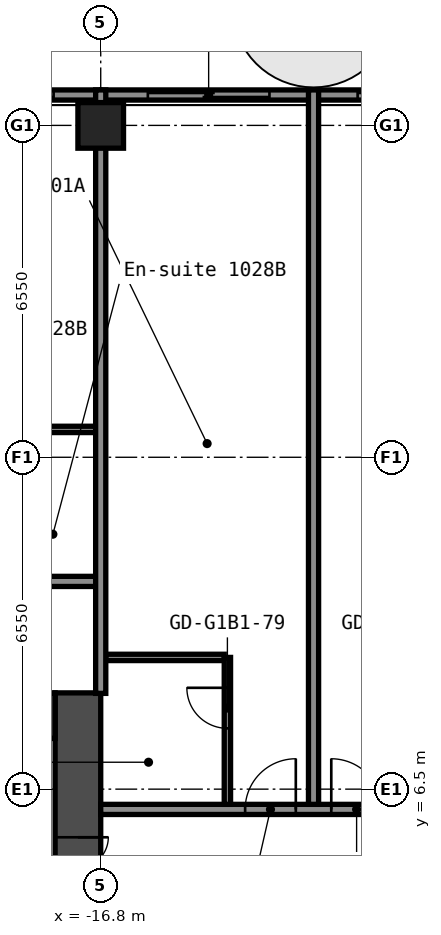
"""IFC4 building model, lengths in metres.
Left out: names, types, materials, properties, quantities, classifications, styles, units other than length and angle.
Written with IfcOpenShell. Run it as: python <this file> out.ifc"""

import sys

from ifc_helpers import new_model, si_unit, direction, frame, frame_2d, origin, origin_2d, place, context, subcontext, project, spatial, rectangle, hollow_rectangle, extrude, element, fill, save


model = new_model("IFC4")
c1 = context("Model", 3, precision=1e-05, world=origin(), true_north=direction((0.0, 1.0)))
c2 = subcontext(c1, "Body", "Model", "MODEL_VIEW")
j1 = project(units=[si_unit("LENGTHUNIT", "METRE"), si_unit("PLANEANGLEUNIT", "RADIAN")], contexts=[c1])
p1 = place(None, origin())
s1 = spatial("IfcSite", under=j1, at=p1, CompositionType="ELEMENT")
p2 = place(p1, origin())
s2 = spatial("IfcBuilding", under=s1, at=p2, CompositionType="ELEMENT")
p3 = place(p2, frame((0.0, 0.0, 39.0)))
s3 = spatial("IfcBuildingStorey", under=s2, at=p3, CompositionType="ELEMENT", Elevation=39.0)
p4 = place(p3, frame((-16.8, 19.6, 0.0), z_axis=(0.0, 0.0, 1.0), x_axis=(1.0, 0.0, 0.0)))
e1 = element("IfcColumn", 1, at=p4, inside=s3, PredefinedType="COLUMN", context=c2, shape_type="SweptSolid", body=[
    extrude(hollow_rectangle(XDim=0.9, YDim=0.9, WallThickness=0.036, at=origin_2d()), origin(), (0.0, 0.0, 1.0), 2.8),
])
p5 = place(p3, frame((-17.25, -8.4, 0.0), z_axis=(0.0, 0.0, 1.0), x_axis=(0.0, 1.0, 0.0)))
e2 = element("IfcWall", 2, at=p5, inside=s3, PredefinedType="SHEAR", context=c2, shape_type="SweptSolid", body=[
    extrude(rectangle(XDim=16.8, YDim=0.9, at=frame_2d((8.4, 0.0))), origin(), (0.0, 0.0, 1.0), 2.8),
])
p6 = place(p5, frame((12.75, 0.0, 0.0)))
e3 = element("IfcOpeningElement", 3, at=p6, cuts=e2, PredefinedType="OPENING", context=c2, shape_type="SweptSolid", body=[
    extrude(rectangle(XDim=1.2, YDim=2.1, at=frame_2d((0.6, 1.05))), frame((0.0, 0.46, 0.0), z_axis=(0.0, -1.0, 0.0), x_axis=(1.0, 0.0, 0.0)), (0.0, 0.0, 1.0), 0.92),
])
p7 = place(p5, frame((2.85, 0.0, 0.0)))
e4 = element("IfcOpeningElement", 4, at=p7, cuts=e2, PredefinedType="OPENING", context=c2, shape_type="SweptSolid", body=[
    extrude(rectangle(XDim=1.2, YDim=2.1, at=frame_2d((0.6, 1.05))), frame((0.0, 0.46, 0.0), z_axis=(0.0, -1.0, 0.0), x_axis=(1.0, 0.0, 0.0)), (0.0, 0.0, 1.0), 0.92),
])
p8 = place(p3, frame((-32.7, 7.95, 0.0), z_axis=(0.0, 0.0, 1.0), x_axis=(1.0, 0.0, 0.0)))
e5 = element("IfcWall", 5, at=p8, inside=s3, PredefinedType="SHEAR", context=c2, shape_type="SweptSolid", body=[
    extrude(rectangle(XDim=15.0, YDim=0.9, at=frame_2d((7.5, 0.0))), origin(), (0.0, 0.0, 1.0), 2.8),
])
p9 = place(p8, frame((3.4, 0.0, 0.0)))
e6 = element("IfcOpeningElement", 6, at=p9, cuts=e5, PredefinedType="OPENING", context=c2, shape_type="SweptSolid", body=[
    extrude(rectangle(XDim=1.2, YDim=2.1, at=frame_2d((0.6, 1.05))), frame((0.0, 0.46, 0.0), z_axis=(0.0, -1.0, 0.0), x_axis=(1.0, 0.0, 0.0)), (0.0, 0.0, 1.0), 0.92),
])
p10 = place(p8, frame((0.75, 0.0, 0.0)))
e7 = element("IfcOpeningElement", 7, at=p10, cuts=e5, PredefinedType="OPENING", context=c2, shape_type="SweptSolid", body=[
    extrude(rectangle(XDim=0.9, YDim=2.1, at=frame_2d((0.45, 1.05))), frame((0.0, 0.46, 0.0), z_axis=(0.0, -1.0, 0.0), x_axis=(1.0, 0.0, 0.0)), (0.0, 0.0, 1.0), 0.92),
])
p11 = place(p3, frame((-16.8, 6.1, 0.0), z_axis=(0.0, 0.0, 1.0), x_axis=(1.0, 0.0, 0.0)))
e8 = element("IfcWall", 8, at=p11, inside=s3, PredefinedType="PARTITIONING", context=c2, shape_type="SweptSolid", body=[
    extrude(rectangle(XDim=33.6, YDim=0.2, at=frame_2d((16.8, 0.0))), origin(), (0.0, 0.0, 1.0), 2.8),
])
p12 = place(p11, frame((2.85, 0.0, 0.0)))
e9 = element("IfcOpeningElement", 9, at=p12, cuts=e8, PredefinedType="OPENING", context=c2, shape_type="SweptSolid", body=[
    extrude(rectangle(XDim=1.0, YDim=2.1, at=frame_2d((0.5, 1.05))), frame((0.0, 0.11, 0.0), z_axis=(0.0, -1.0, 0.0), x_axis=(1.0, 0.0, 0.0)), (0.0, 0.0, 1.0), 0.22),
])
p13 = place(p11, frame((4.55, 0.0, 0.0)))
e10 = element("IfcOpeningElement", 10, at=p13, cuts=e8, PredefinedType="OPENING", context=c2, shape_type="SweptSolid", body=[
    extrude(rectangle(XDim=1.0, YDim=2.1, at=frame_2d((0.5, 1.05))), frame((0.0, 0.11, 0.0), z_axis=(0.0, -1.0, 0.0), x_axis=(1.0, 0.0, 0.0)), (0.0, 0.0, 1.0), 0.22),
])
p14 = place(p11, frame((10.555, 0.0, 0.0)))
e11 = element("IfcOpeningElement", 11, at=p14, cuts=e8, PredefinedType="OPENING", context=c2, shape_type="SweptSolid", body=[
    extrude(rectangle(XDim=0.9, YDim=2.1, at=frame_2d((0.45, 1.05))), frame((0.0, 0.11, 0.0), z_axis=(0.0, -1.0, 0.0), x_axis=(1.0, 0.0, 0.0)), (0.0, 0.0, 1.0), 0.22),
])
p15 = place(p11, frame((14.755, 0.0, 0.0)))
e12 = element("IfcOpeningElement", 12, at=p15, cuts=e8, PredefinedType="OPENING", context=c2, shape_type="SweptSolid", body=[
    extrude(rectangle(XDim=0.9, YDim=2.1, at=frame_2d((0.45, 1.05))), frame((0.0, 0.11, 0.0), z_axis=(0.0, -1.0, 0.0), x_axis=(1.0, 0.0, 0.0)), (0.0, 0.0, 1.0), 0.22),
])
p16 = place(p11, frame((19.65, 0.0, 0.0)))
e13 = element("IfcOpeningElement", 13, at=p16, cuts=e8, PredefinedType="OPENING", context=c2, shape_type="SweptSolid", body=[
    extrude(rectangle(XDim=1.0, YDim=2.1, at=frame_2d((0.5, 1.05))), frame((0.0, 0.11, 0.0), z_axis=(0.0, -1.0, 0.0), x_axis=(1.0, 0.0, 0.0)), (0.0, 0.0, 1.0), 0.22),
])
p17 = place(p11, frame((21.35, 0.0, 0.0)))
e14 = element("IfcOpeningElement", 14, at=p17, cuts=e8, PredefinedType="OPENING", context=c2, shape_type="SweptSolid", body=[
    extrude(rectangle(XDim=1.0, YDim=2.1, at=frame_2d((0.5, 1.05))), frame((0.0, 0.11, 0.0), z_axis=(0.0, -1.0, 0.0), x_axis=(1.0, 0.0, 0.0)), (0.0, 0.0, 1.0), 0.22),
])
p18 = place(p11, frame((28.05, 0.0, 0.0)))
e15 = element("IfcOpeningElement", 15, at=p18, cuts=e8, PredefinedType="OPENING", context=c2, shape_type="SweptSolid", body=[
    extrude(rectangle(XDim=1.0, YDim=2.1, at=frame_2d((0.5, 1.05))), frame((0.0, 0.11, 0.0), z_axis=(0.0, -1.0, 0.0), x_axis=(1.0, 0.0, 0.0)), (0.0, 0.0, 1.0), 0.22),
])
p19 = place(p11, frame((29.75, 0.0, 0.0)))
e16 = element("IfcOpeningElement", 16, at=p19, cuts=e8, PredefinedType="OPENING", context=c2, shape_type="SweptSolid", body=[
    extrude(rectangle(XDim=1.0, YDim=2.1, at=frame_2d((0.5, 1.05))), frame((0.0, 0.11, 0.0), z_axis=(0.0, -1.0, 0.0), x_axis=(1.0, 0.0, 0.0)), (0.0, 0.0, 1.0), 0.22),
])
p20 = place(p3, frame((-16.7, 9.1, 0.0), z_axis=(0.0, 0.0, 1.0), x_axis=(1.0, 0.0, 0.0)))
e17 = element("IfcWall", 17, at=p20, inside=s3, PredefinedType="PARTITIONING", context=c2, shape_type="SweptSolid", body=[
    extrude(rectangle(XDim=2.337, YDim=0.125, at=frame_2d((1.169, 0.0))), origin(), (0.0, 0.0, 1.0), 2.8),
])
p21 = place(p3, frame((-51.1, 10.6, 0.0), z_axis=(0.0, 0.0, 1.0), x_axis=(1.0, 0.0, 0.0)))
e18 = element("IfcWall", 18, at=p21, inside=s3, PredefinedType="PARTITIONING", context=c2, shape_type="SweptSolid", body=[
    extrude(rectangle(XDim=34.3, YDim=0.2, at=frame_2d((17.15, 0.0))), origin(), (0.0, 0.0, 1.0), 2.8),
])
p22 = place(p21, frame((3.25, 0.0, 0.0)))
e19 = element("IfcOpeningElement", 19, at=p22, cuts=e18, PredefinedType="OPENING", context=c2, shape_type="SweptSolid", body=[
    extrude(rectangle(XDim=1.0, YDim=2.1, at=frame_2d((0.5, 1.05))), frame((0.0, 0.11, 0.0), z_axis=(0.0, -1.0, 0.0), x_axis=(1.0, 0.0, 0.0)), (0.0, 0.0, 1.0), 0.22),
])
p23 = place(p21, frame((5.15, 0.0, 0.0)))
e20 = element("IfcOpeningElement", 20, at=p23, cuts=e18, PredefinedType="OPENING", context=c2, shape_type="SweptSolid", body=[
    extrude(rectangle(XDim=1.0, YDim=2.1, at=frame_2d((0.5, 1.05))), frame((0.0, 0.11, 0.0), z_axis=(0.0, -1.0, 0.0), x_axis=(1.0, 0.0, 0.0)), (0.0, 0.0, 1.0), 0.22),
])
p24 = place(p21, frame((14.6, 0.0, 0.0)))
e21 = element("IfcOpeningElement", 21, at=p24, cuts=e18, PredefinedType="OPENING", context=c2, shape_type="SweptSolid", body=[
    extrude(rectangle(XDim=1.0, YDim=2.1, at=frame_2d((0.5, 1.05))), frame((0.0, 0.11, 0.0), z_axis=(0.0, -1.0, 0.0), x_axis=(1.0, 0.0, 0.0)), (0.0, 0.0, 1.0), 0.22),
])
p25 = place(p21, frame((19.4, 0.0, 0.0)))
e22 = element("IfcOpeningElement", 22, at=p25, cuts=e18, PredefinedType="OPENING", context=c2, shape_type="SweptSolid", body=[
    extrude(rectangle(XDim=1.0, YDim=2.1, at=frame_2d((0.5, 1.05))), frame((0.0, 0.11, 0.0), z_axis=(0.0, -1.0, 0.0), x_axis=(1.0, 0.0, 0.0)), (0.0, 0.0, 1.0), 0.22),
])
p26 = place(p21, frame((28.75, 0.0, 0.0)))
e23 = element("IfcOpeningElement", 23, at=p26, cuts=e18, PredefinedType="OPENING", context=c2, shape_type="SweptSolid", body=[
    extrude(rectangle(XDim=1.0, YDim=2.1, at=frame_2d((0.5, 1.05))), frame((0.0, 0.11, 0.0), z_axis=(0.0, -1.0, 0.0), x_axis=(1.0, 0.0, 0.0)), (0.0, 0.0, 1.0), 0.22),
])
p27 = place(p21, frame((30.45, 0.0, 0.0)))
e24 = element("IfcOpeningElement", 24, at=p27, cuts=e18, PredefinedType="OPENING", context=c2, shape_type="SweptSolid", body=[
    extrude(rectangle(XDim=1.0, YDim=2.1, at=frame_2d((0.5, 1.05))), frame((0.0, 0.11, 0.0), z_axis=(0.0, -1.0, 0.0), x_axis=(1.0, 0.0, 0.0)), (0.0, 0.0, 1.0), 0.22),
])
p28 = place(p3, frame((-19.238, 13.6, 0.0), z_axis=(0.0, 0.0, 1.0), x_axis=(1.0, 0.0, 0.0)))
e25 = element("IfcWall", 25, at=p28, inside=s3, PredefinedType="PARTITIONING", context=c2, shape_type="SweptSolid", body=[
    extrude(rectangle(XDim=2.338, YDim=0.125, at=frame_2d((1.169, 0.0))), origin(), (0.0, 0.0, 1.0), 2.8),
])
p29 = place(p3, frame((-16.8, 8.39, 0.0), z_axis=(0.0, 0.0, 1.0), x_axis=(0.0, 1.0, 0.0)))
e26 = element("IfcWall", 26, at=p29, inside=s3, PredefinedType="PARTITIONING", context=c2, shape_type="SweptSolid", body=[
    extrude(rectangle(XDim=11.91, YDim=0.2, at=frame_2d((5.955, 0.0))), origin(), (0.0, 0.0, 1.0), 2.8),
])
p30 = place(p3, frame((-14.3, 6.2, 0.0), z_axis=(0.0, 0.0, 1.0), x_axis=(0.0, 1.0, 0.0)))
e27 = element("IfcWall", 27, at=p30, inside=s3, PredefinedType="PARTITIONING", context=c2, shape_type="SweptSolid", body=[
    extrude(rectangle(XDim=2.9, YDim=0.125, at=frame_2d((1.45, 0.0))), origin(), (0.0, 0.0, 1.0), 2.8),
])
p31 = place(p30, frame((1.5, 0.0, 0.0)))
e28 = element("IfcOpeningElement", 28, at=p31, cuts=e27, PredefinedType="OPENING", context=c2, shape_type="SweptSolid", body=[
    extrude(rectangle(XDim=0.8, YDim=2.1, at=frame_2d((0.4, 1.05))), frame((0.0, 0.073, 0.0), z_axis=(0.0, -1.0, 0.0), x_axis=(1.0, 0.0, 0.0)), (0.0, 0.0, 1.0), 0.145),
])
p32 = place(p3, frame((-12.6, 6.2, 0.0), z_axis=(0.0, 0.0, 1.0), x_axis=(0.0, 1.0, 0.0)))
e29 = element("IfcWall", 29, at=p32, inside=s3, PredefinedType="PARTITIONING", context=c2, shape_type="SweptSolid", body=[
    extrude(rectangle(XDim=14.1, YDim=0.2, at=frame_2d((7.05, 0.0))), origin(), (0.0, 0.0, 1.0), 2.8),
])
p33 = place(p3, frame((-8.42, 20.2, 0.0), z_axis=(0.0, 0.0, 1.0), x_axis=(-1.0, 0.0, 0.0)))
p34 = place(p33, frame((0.91, 0.0, 0.0)))
p35 = place(p34, frame((2.4, 0.0, 0.0), z_axis=(0.0, 0.0, 1.0), x_axis=(-1.0, 0.0, 0.0)))
e30 = element("IfcDoor", 30, at=p35, inside=s3, OperationType="SLIDING_TO_LEFT", PredefinedType="DOOR", context=c2, shape_type="SweptSolid", body=[
    extrude(rectangle(XDim=2.4, YDim=2.2, at=frame_2d((1.2, 1.1))), frame((0.0, 0.025, 0.0), z_axis=(0.0, -1.0, 0.0), x_axis=(1.0, 0.0, 0.0)), (0.0, 0.0, 1.0), 0.05),
])
p36 = place(p3, frame((-12.56, 20.2, 0.0), z_axis=(0.0, 0.0, 1.0), x_axis=(-1.0, 0.0, 0.0)))
p37 = place(p36, frame((0.91, 0.0, 0.0)))
p38 = place(p37, frame((2.4, 0.0, 0.0), z_axis=(0.0, 0.0, 1.0), x_axis=(-1.0, 0.0, 0.0)))
e31 = element("IfcDoor", 31, at=p38, inside=s3, OperationType="SLIDING_TO_LEFT", PredefinedType="DOOR", context=c2, shape_type="SweptSolid", body=[
    extrude(rectangle(XDim=2.4, YDim=2.2, at=frame_2d((1.2, 1.1))), frame((0.0, 0.025, 0.0), z_axis=(0.0, -1.0, 0.0), x_axis=(1.0, 0.0, 0.0)), (0.0, 0.0, 1.0), 0.05),
])
p39 = place(p3, frame((-16.82, 20.2, 0.0), z_axis=(0.0, 0.0, 1.0), x_axis=(-1.0, 0.0, 0.0)))
p40 = place(p39, frame((0.91, 0.0, 0.0)))
p41 = place(p40, frame((2.4, 0.0, 0.0), z_axis=(0.0, 0.0, 1.0), x_axis=(-1.0, 0.0, 0.0)))
e32 = element("IfcDoor", 32, at=p41, inside=s3, OperationType="SLIDING_TO_LEFT", PredefinedType="DOOR", context=c2, shape_type="SweptSolid", body=[
    extrude(rectangle(XDim=2.4, YDim=2.2, at=frame_2d((1.2, 1.1))), frame((0.0, 0.025, 0.0), z_axis=(0.0, -1.0, 0.0), x_axis=(1.0, 0.0, 0.0)), (0.0, 0.0, 1.0), 0.05),
])
p42 = place(p6, origin())
e33 = element("IfcDoor", 33, at=p42, inside=s3, OperationType="DOUBLE_DOOR_SINGLE_SWING", PredefinedType="DOOR", context=c2, shape_type="SweptSolid", body=[
    extrude(rectangle(XDim=1.2, YDim=2.1, at=frame_2d((0.6, 1.05))), frame((0.0, 0.025, 0.0), z_axis=(0.0, -1.0, 0.0), x_axis=(1.0, 0.0, 0.0)), (0.0, 0.0, 1.0), 0.05),
])
fill(e3, e33)
p43 = place(p12, origin())
e34 = element("IfcDoor", 34, at=p43, inside=s3, OperationType="SINGLE_SWING_LEFT", PredefinedType="DOOR", context=c2, shape_type="SweptSolid", body=[
    extrude(rectangle(XDim=1.0, YDim=2.1, at=frame_2d((0.5, 1.05))), frame((0.0, 0.025, 0.0), z_axis=(0.0, -1.0, 0.0), x_axis=(1.0, 0.0, 0.0)), (0.0, 0.0, 1.0), 0.05),
])
fill(e9, e34)
p44 = place(p13, origin())
e35 = element("IfcDoor", 35, at=p44, inside=s3, OperationType="SINGLE_SWING_RIGHT", PredefinedType="DOOR", context=c2, shape_type="SweptSolid", body=[
    extrude(rectangle(XDim=1.0, YDim=2.1, at=frame_2d((0.5, 1.05))), frame((0.0, 0.025, 0.0), z_axis=(0.0, -1.0, 0.0), x_axis=(1.0, 0.0, 0.0)), (0.0, 0.0, 1.0), 0.05),
])
fill(e10, e35)
p45 = place(p31, origin())
e36 = element("IfcDoor", 36, at=p45, inside=s3, OperationType="SINGLE_SWING_LEFT", PredefinedType="DOOR", context=c2, shape_type="SweptSolid", body=[
    extrude(rectangle(XDim=0.8, YDim=2.1, at=frame_2d((0.4, 1.05))), frame((0.0, 0.025, 0.0), z_axis=(0.0, -1.0, 0.0), x_axis=(1.0, 0.0, 0.0)), (0.0, 0.0, 1.0), 0.05),
])
fill(e28, e36)
save(model, sys.argv[1])
